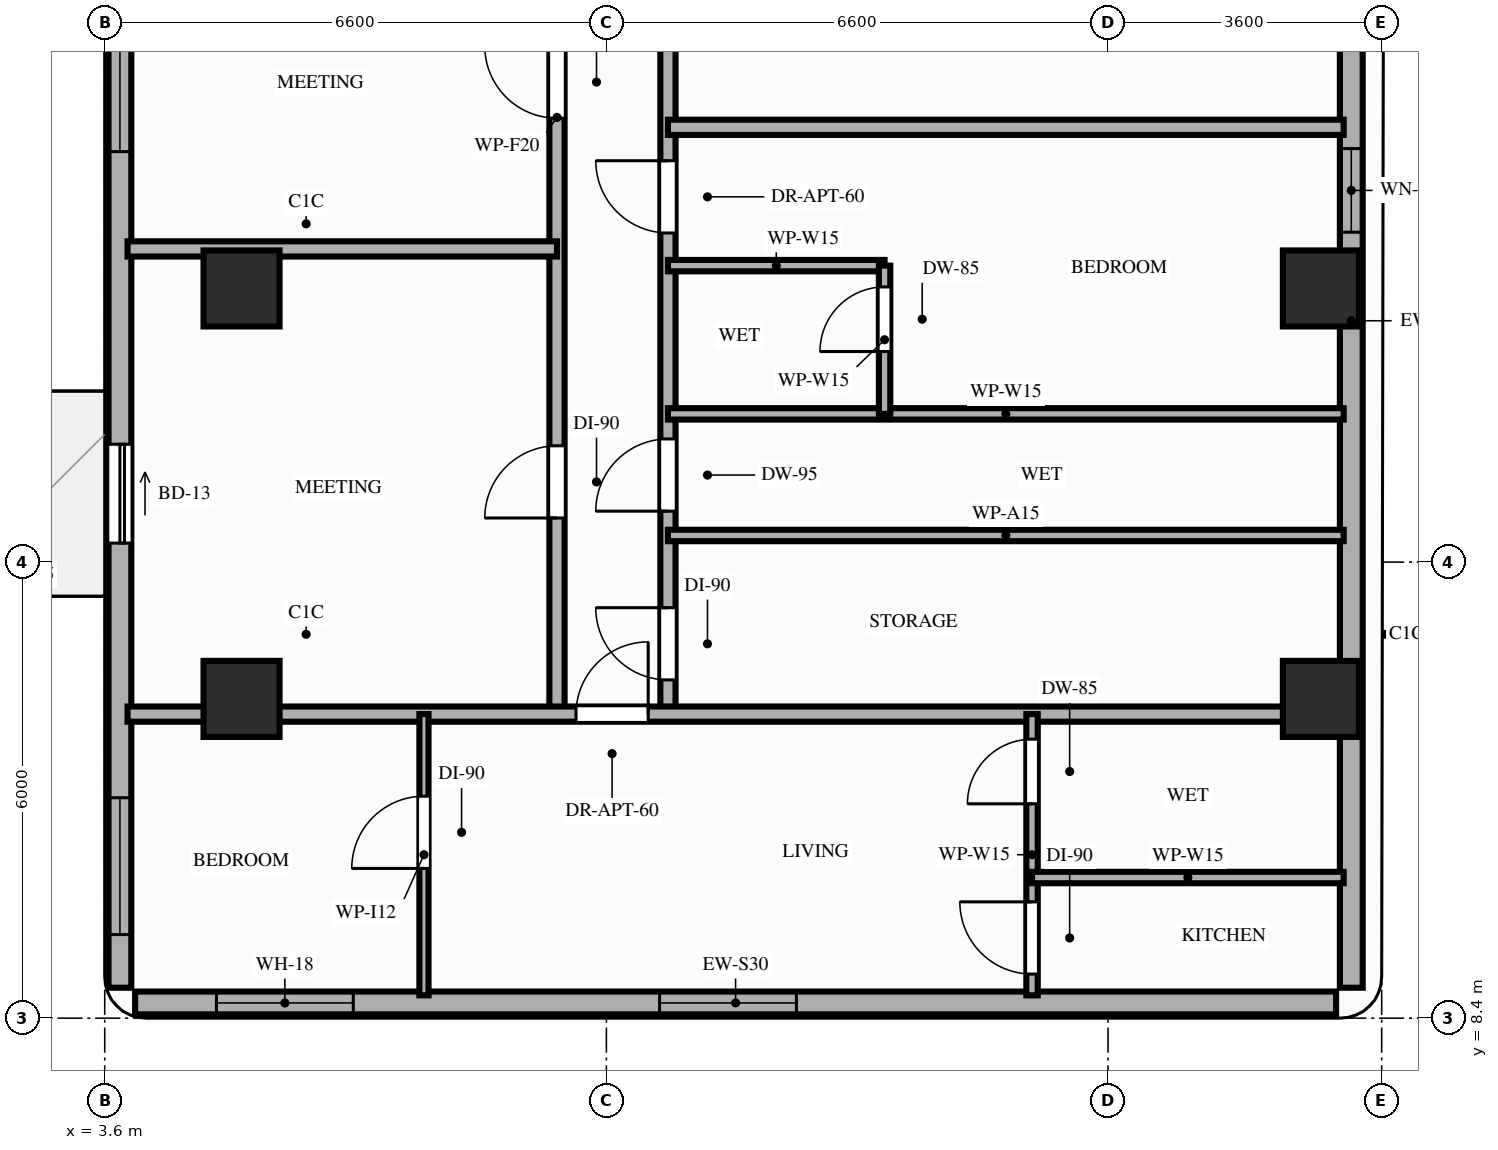
"""IFC4 building model, lengths in metres.
Left out: names, types, materials, properties, quantities, classifications, styles, units other than length and angle.
Written with IfcOpenShell. Run it as: python <this file> out.ifc"""

import sys

from ifc_helpers import new_model, si_unit, direction, frame, frame_2d, origin, origin_2d, place, context, subcontext, project, spatial, rectangle, extrude, element, fill, save


model = new_model("IFC4")
c1 = context("Model", 3, precision=1e-05, world=origin(), true_north=direction((0.0, 1.0)))
c2 = subcontext(c1, "Body", "Model", "MODEL_VIEW")
j1 = project(units=[si_unit("LENGTHUNIT", "METRE"), si_unit("PLANEANGLEUNIT", "RADIAN")], contexts=[c1])
p1 = place(None, origin())
s1 = spatial("IfcSite", under=j1, at=p1, CompositionType="ELEMENT")
p2 = place(p1, origin())
s2 = spatial("IfcBuilding", under=s1, at=p2, CompositionType="ELEMENT")
p3 = place(p2, frame((0.0, 0.0, 129.8)))
s3 = spatial("IfcBuildingStorey", under=s2, at=p3, CompositionType="ELEMENT", Elevation=129.8)
for number, where, z_axis, x_axis in (
    (1, (5.4, 12.6, 0.0), (0.0, 0.0, 1.0), (1.0, 0.0, 0.0)),
    (2, (19.6, 12.6, 0.0), (0.0, 0.0, 1.0), (1.0, 0.0, 0.0)),
    (3, (5.4, 18.0, 0.0), (0.0, 0.0, 1.0), (1.0, 0.0, 0.0)),
    (4, (19.6, 18.0, 0.0), (0.0, 0.0, 1.0), (1.0, 0.0, 0.0)),
):
    element("IfcColumn", number, at=place(p3, frame(where, z_axis=z_axis, x_axis=x_axis)), inside=s3, PredefinedType="COLUMN", context=c2, shape_type="SweptSolid", body=[
        extrude(rectangle(XDim=1.0, YDim=1.0, at=origin_2d()), origin(), (0.0, 0.0, 1.0), 3.2),
    ])
p4 = place(p3, frame((4.0, 8.6, 0.0), z_axis=(0.0, 0.0, 1.0), x_axis=(1.0, 0.0, 0.0)))
e5 = element("IfcWall", 5, at=p4, inside=s3, PredefinedType="STANDARD", context=c2, shape_type="SweptSolid", body=[
    extrude(rectangle(XDim=15.8, YDim=0.3, at=frame_2d((7.9, 0.0))), origin(), (0.0, 0.0, 1.0), 3.02),
])
p5 = place(p4, frame((1.07, 0.0, 0.85)))
e6 = element("IfcOpeningElement", 6, at=p5, cuts=e5, PredefinedType="OPENING", context=c2, shape_type="SweptSolid", body=[
    extrude(rectangle(XDim=1.8, YDim=1.75, at=frame_2d((0.9, 0.875))), frame((0.0, 0.16, 0.0), z_axis=(0.0, -1.0, 0.0), x_axis=(1.0, 0.0, 0.0)), (0.0, 0.0, 1.0), 0.32),
])
p6 = place(p4, frame((6.9, 0.0, 0.85)))
e7 = element("IfcOpeningElement", 7, at=p6, cuts=e5, PredefinedType="OPENING", context=c2, shape_type="SweptSolid", body=[
    extrude(rectangle(XDim=1.8, YDim=1.75, at=frame_2d((0.9, 0.875))), frame((0.0, 0.16, 0.0), z_axis=(0.0, -1.0, 0.0), x_axis=(1.0, 0.0, 0.0)), (0.0, 0.0, 1.0), 0.32),
])
p7 = place(p3, frame((3.8, 42.1, 0.0), z_axis=(0.0, 0.0, 1.0), x_axis=(0.0, -1.0, 0.0)))
e8 = element("IfcWall", 8, at=p7, inside=s3, PredefinedType="STANDARD", context=c2, shape_type="SweptSolid", body=[
    extrude(rectangle(XDim=33.3, YDim=0.3, at=frame_2d((16.65, 0.0))), origin(), (0.0, 0.0, 1.0), 2.71),
])
p8 = place(p7, frame((26.15, 0.0, 0.0)))
e9 = element("IfcOpeningElement", 9, at=p8, cuts=e8, PredefinedType="OPENING", context=c2, shape_type="SweptSolid", body=[
    extrude(rectangle(XDim=1.3, YDim=2.08, at=frame_2d((0.65, 1.04))), frame((0.0, 0.16, 0.0), z_axis=(0.0, -1.0, 0.0), x_axis=(1.0, 0.0, 0.0)), (0.0, 0.0, 1.0), 0.32),
])
p9 = place(p7, frame((15.35, 0.0, 0.0)))
e10 = element("IfcOpeningElement", 10, at=p9, cuts=e8, PredefinedType="OPENING", context=c2, shape_type="SweptSolid", body=[
    extrude(rectangle(XDim=1.3, YDim=2.08, at=frame_2d((0.65, 1.04))), frame((0.0, 0.16, 0.0), z_axis=(0.0, -1.0, 0.0), x_axis=(1.0, 0.0, 0.0)), (0.0, 0.0, 1.0), 0.32),
])
p10 = place(p7, frame((30.8, 0.0, 0.85)))
e11 = element("IfcOpeningElement", 11, at=p10, cuts=e8, PredefinedType="OPENING", context=c2, shape_type="SweptSolid", body=[
    extrude(rectangle(XDim=1.8, YDim=1.61, at=frame_2d((0.9, 0.805))), frame((0.0, 0.16, 0.0), z_axis=(0.0, -1.0, 0.0), x_axis=(1.0, 0.0, 0.0)), (0.0, 0.0, 1.0), 0.32),
])
p11 = place(p7, frame((20.5, 0.0, 0.85)))
e12 = element("IfcOpeningElement", 12, at=p11, cuts=e8, PredefinedType="OPENING", context=c2, shape_type="SweptSolid", body=[
    extrude(rectangle(XDim=1.8, YDim=1.61, at=frame_2d((0.9, 0.805))), frame((0.0, 0.16, 0.0), z_axis=(0.0, -1.0, 0.0), x_axis=(1.0, 0.0, 0.0)), (0.0, 0.0, 1.0), 0.32),
])
p12 = place(p7, frame((9.9, 0.0, 0.85)))
e13 = element("IfcOpeningElement", 13, at=p12, cuts=e8, PredefinedType="OPENING", context=c2, shape_type="SweptSolid", body=[
    extrude(rectangle(XDim=1.8, YDim=1.61, at=frame_2d((0.9, 0.805))), frame((0.0, 0.16, 0.0), z_axis=(0.0, -1.0, 0.0), x_axis=(1.0, 0.0, 0.0)), (0.0, 0.0, 1.0), 0.32),
])
p13 = place(p7, frame((3.8, 0.0, 0.85)))
e14 = element("IfcOpeningElement", 14, at=p13, cuts=e8, PredefinedType="OPENING", context=c2, shape_type="SweptSolid", body=[
    extrude(rectangle(XDim=1.8, YDim=1.61, at=frame_2d((0.9, 0.805))), frame((0.0, 0.16, 0.0), z_axis=(0.0, -1.0, 0.0), x_axis=(1.0, 0.0, 0.0)), (0.0, 0.0, 1.0), 0.32),
])
p14 = place(p3, frame((20.0, 8.8, 0.0), z_axis=(0.0, 0.0, 1.0), x_axis=(0.0, 1.0, 0.0)))
e15 = element("IfcWall", 15, at=p14, inside=s3, PredefinedType="STANDARD", context=c2, shape_type="SweptSolid", body=[
    extrude(rectangle(XDim=17.55, YDim=0.3, at=frame_2d((8.775, 0.0))), origin(), (0.0, 0.0, 1.0), 2.45),
])
p15 = place(p14, frame((9.94, 0.0, 0.85)))
e16 = element("IfcOpeningElement", 16, at=p15, cuts=e15, PredefinedType="OPENING", context=c2, shape_type="SweptSolid", body=[
    extrude(rectangle(XDim=1.1, YDim=1.35, at=frame_2d((0.55, 0.675))), frame((0.0, 0.16, 0.0), z_axis=(0.0, -1.0, 0.0), x_axis=(1.0, 0.0, 0.0)), (0.0, 0.0, 1.0), 0.32),
])
p16 = place(p3, frame((9.55, 12.4, 0.0), z_axis=(0.0, 0.0, 1.0), x_axis=(0.0, 1.0, 0.0)))
e17 = element("IfcWall", 17, at=p16, inside=s3, PredefinedType="PARTITIONING", context=c2, shape_type="SweptSolid", body=[
    extrude(rectangle(XDim=15.7, YDim=0.2, at=frame_2d((7.85, 0.0))), origin(), (0.0, 0.0, 1.0), 2.45),
])
p17 = place(p16, frame((2.58, 0.0, 0.0)))
e18 = element("IfcOpeningElement", 18, at=p17, cuts=e17, PredefinedType="OPENING", context=c2, shape_type="SweptSolid", body=[
    extrude(rectangle(XDim=0.95, YDim=2.15, at=frame_2d((0.475, 1.075))), frame((0.0, 0.11, 0.0), z_axis=(0.0, -1.0, 0.0), x_axis=(1.0, 0.0, 0.0)), (0.0, 0.0, 1.0), 0.22),
])
p18 = place(p16, frame((7.84, 0.0, 0.0)))
e19 = element("IfcOpeningElement", 19, at=p18, cuts=e17, PredefinedType="OPENING", context=c2, shape_type="SweptSolid", body=[
    extrude(rectangle(XDim=0.95, YDim=2.15, at=frame_2d((0.475, 1.075))), frame((0.0, 0.11, 0.0), z_axis=(0.0, -1.0, 0.0), x_axis=(1.0, 0.0, 0.0)), (0.0, 0.0, 1.0), 0.22),
])
p19 = place(p16, frame((12.63, 0.0, 0.0)))
e20 = element("IfcOpeningElement", 20, at=p19, cuts=e17, PredefinedType="OPENING", context=c2, shape_type="SweptSolid", body=[
    extrude(rectangle(XDim=0.95, YDim=2.15, at=frame_2d((0.475, 1.075))), frame((0.0, 0.11, 0.0), z_axis=(0.0, -1.0, 0.0), x_axis=(1.0, 0.0, 0.0)), (0.0, 0.0, 1.0), 0.22),
])
p20 = place(p3, frame((11.01, 12.4, 0.0), z_axis=(0.0, 0.0, 1.0), x_axis=(0.0, 1.0, 0.0)))
e21 = element("IfcWall", 21, at=p20, inside=s3, PredefinedType="PARTITIONING", context=c2, shape_type="SweptSolid", body=[
    extrude(rectangle(XDim=15.7, YDim=0.2, at=frame_2d((7.85, 0.0))), origin(), (0.0, 0.0, 1.0), 2.45),
])
p21 = place(p20, frame((0.45, 0.0, 0.0)))
e22 = element("IfcOpeningElement", 22, at=p21, cuts=e21, PredefinedType="OPENING", context=c2, shape_type="SweptSolid", body=[
    extrude(rectangle(XDim=0.95, YDim=2.15, at=frame_2d((0.475, 1.075))), frame((0.0, 0.11, 0.0), z_axis=(0.0, -1.0, 0.0), x_axis=(1.0, 0.0, 0.0)), (0.0, 0.0, 1.0), 0.22),
])
p22 = place(p20, frame((2.67, 0.0, 0.0)))
e23 = element("IfcOpeningElement", 23, at=p22, cuts=e21, PredefinedType="OPENING", context=c2, shape_type="SweptSolid", body=[
    extrude(rectangle(XDim=0.95, YDim=2.1, at=frame_2d((0.475, 1.05))), frame((0.0, 0.11, 0.0), z_axis=(0.0, -1.0, 0.0), x_axis=(1.0, 0.0, 0.0)), (0.0, 0.0, 1.0), 0.22),
])
p23 = place(p20, frame((11.23, 0.0, 0.0)))
e24 = element("IfcOpeningElement", 24, at=p23, cuts=e21, PredefinedType="OPENING", context=c2, shape_type="SweptSolid", body=[
    extrude(rectangle(XDim=0.95, YDim=2.15, at=frame_2d((0.475, 1.075))), frame((0.0, 0.11, 0.0), z_axis=(0.0, -1.0, 0.0), x_axis=(1.0, 0.0, 0.0)), (0.0, 0.0, 1.0), 0.22),
])
p24 = place(p20, frame((6.33, 0.0, 0.0)))
e25 = element("IfcOpeningElement", 25, at=p24, cuts=e21, PredefinedType="OPENING", context=c2, shape_type="SweptSolid", body=[
    extrude(rectangle(XDim=0.95, YDim=2.15, at=frame_2d((0.475, 1.075))), frame((0.0, 0.11, 0.0), z_axis=(0.0, -1.0, 0.0), x_axis=(1.0, 0.0, 0.0)), (0.0, 0.0, 1.0), 0.22),
])
p25 = place(p3, frame((3.9, 12.4, 0.0), z_axis=(0.0, 0.0, 1.0), x_axis=(1.0, 0.0, 0.0)))
e26 = element("IfcWall", 26, at=p25, inside=s3, PredefinedType="PARTITIONING", context=c2, shape_type="SweptSolid", body=[
    extrude(rectangle(XDim=16.0, YDim=0.2, at=frame_2d((8.0, 0.0))), origin(), (0.0, 0.0, 1.0), 2.45),
])
p26 = place(p25, frame((5.9, 0.0, 0.0)))
e27 = element("IfcOpeningElement", 27, at=p26, cuts=e26, PredefinedType="OPENING", context=c2, shape_type="SweptSolid", body=[
    extrude(rectangle(XDim=0.95, YDim=2.15, at=frame_2d((0.475, 1.075))), frame((0.0, 0.11, 0.0), z_axis=(0.0, -1.0, 0.0), x_axis=(1.0, 0.0, 0.0)), (0.0, 0.0, 1.0), 0.22),
])
p27 = place(p3, frame((3.9, 18.52, 0.0), z_axis=(0.0, 0.0, 1.0), x_axis=(1.0, 0.0, 0.0)))
e28 = element("IfcWall", 28, at=p27, inside=s3, PredefinedType="PARTITIONING", context=c2, shape_type="SweptSolid", body=[
    extrude(rectangle(XDim=5.65, YDim=0.2, at=frame_2d((2.825, 0.0))), origin(), (0.0, 0.0, 1.0), 2.45),
])
p28 = place(p3, frame((7.8, 8.7, 0.0), z_axis=(0.0, 0.0, 1.0), x_axis=(0.0, 1.0, 0.0)))
e29 = element("IfcWall", 29, at=p28, inside=s3, PredefinedType="PARTITIONING", context=c2, shape_type="SweptSolid", body=[
    extrude(rectangle(XDim=3.7, YDim=0.12, at=frame_2d((1.85, 0.0))), origin(), (0.0, 0.0, 1.0), 2.45),
])
p29 = place(p28, frame((1.67, 0.0, 0.0)))
e30 = element("IfcOpeningElement", 30, at=p29, cuts=e29, PredefinedType="OPENING", context=c2, shape_type="SweptSolid", body=[
    extrude(rectangle(XDim=0.95, YDim=2.15, at=frame_2d((0.475, 1.075))), frame((0.0, 0.07, 0.0), z_axis=(0.0, -1.0, 0.0), x_axis=(1.0, 0.0, 0.0)), (0.0, 0.0, 1.0), 0.14),
])
p30 = place(p3, frame((15.8, 8.7, 0.0), z_axis=(0.0, 0.0, 1.0), x_axis=(0.0, 1.0, 0.0)))
e31 = element("IfcWall", 31, at=p30, inside=s3, PredefinedType="PARTITIONING", context=c2, shape_type="SweptSolid", body=[
    extrude(rectangle(XDim=3.7, YDim=0.15, at=frame_2d((1.85, 0.0))), origin(), (0.0, 0.0, 1.0), 2.45),
])
p31 = place(p30, frame((0.28, 0.0, 0.0)))
e32 = element("IfcOpeningElement", 32, at=p31, cuts=e31, PredefinedType="OPENING", context=c2, shape_type="SweptSolid", body=[
    extrude(rectangle(XDim=0.95, YDim=2.15, at=frame_2d((0.475, 1.075))), frame((0.0, 0.085, 0.0), z_axis=(0.0, -1.0, 0.0), x_axis=(1.0, 0.0, 0.0)), (0.0, 0.0, 1.0), 0.17),
])
p32 = place(p30, frame((2.52, 0.0, 0.0)))
e33 = element("IfcOpeningElement", 33, at=p32, cuts=e31, PredefinedType="OPENING", context=c2, shape_type="SweptSolid", body=[
    extrude(rectangle(XDim=0.85, YDim=2.1, at=frame_2d((0.425, 1.05))), frame((0.0, 0.085, 0.0), z_axis=(0.0, -1.0, 0.0), x_axis=(1.0, 0.0, 0.0)), (0.0, 0.0, 1.0), 0.17),
])
p33 = place(p3, frame((15.8, 10.25, 0.0), z_axis=(0.0, 0.0, 1.0), x_axis=(1.0, 0.0, 0.0)))
e34 = element("IfcWall", 34, at=p33, inside=s3, PredefinedType="PARTITIONING", context=c2, shape_type="SweptSolid", body=[
    extrude(rectangle(XDim=4.1, YDim=0.15, at=frame_2d((2.05, 0.0))), origin(), (0.0, 0.0, 1.0), 3.02),
])
for number, where, z_axis, x_axis in (
    (35, (11.01, 14.75, 0.0), (0.0, 0.0, 1.0), (1.0, 0.0, 0.0)),
    (36, (11.01, 16.35, 0.0), (0.0, 0.0, 1.0), (1.0, 0.0, 0.0)),
):
    element("IfcWall", number, at=place(p3, frame(where, z_axis=z_axis, x_axis=x_axis)), inside=s3, PredefinedType="PARTITIONING", context=c2, shape_type="SweptSolid", body=[
        extrude(rectangle(XDim=8.89, YDim=0.15, at=frame_2d((4.445, 0.0))), origin(), (0.0, 0.0, 1.0), 2.45),
    ])
p34 = place(p3, frame((11.01, 20.12, 0.0), z_axis=(0.0, 0.0, 1.0), x_axis=(1.0, 0.0, 0.0)))
e37 = element("IfcWall", 37, at=p34, inside=s3, PredefinedType="PARTITIONING", context=c2, shape_type="SweptSolid", body=[
    extrude(rectangle(XDim=8.89, YDim=0.2, at=frame_2d((4.445, 0.0))), origin(), (0.0, 0.0, 1.0), 2.45),
])
p35 = place(p3, frame((11.01, 18.3, 0.0), z_axis=(0.0, 0.0, 1.0), x_axis=(1.0, 0.0, 0.0)))
e38 = element("IfcWall", 38, at=p35, inside=s3, PredefinedType="PARTITIONING", context=c2, shape_type="SweptSolid", body=[
    extrude(rectangle(XDim=2.85, YDim=0.15, at=frame_2d((1.425, 0.0))), origin(), (0.0, 0.0, 1.0), 2.45),
])
p36 = place(p3, frame((13.86, 16.35, 0.0), z_axis=(0.0, 0.0, 1.0), x_axis=(0.0, 1.0, 0.0)))
e39 = element("IfcWall", 39, at=p36, inside=s3, PredefinedType="PARTITIONING", context=c2, shape_type="SweptSolid", body=[
    extrude(rectangle(XDim=1.95, YDim=0.15, at=frame_2d((0.975, 0.0))), origin(), (0.0, 0.0, 1.0), 2.45),
])
p37 = place(p36, frame((0.82, 0.0, 0.0)))
e40 = element("IfcOpeningElement", 40, at=p37, cuts=e39, PredefinedType="OPENING", context=c2, shape_type="SweptSolid", body=[
    extrude(rectangle(XDim=0.85, YDim=2.1, at=frame_2d((0.425, 1.05))), frame((0.0, 0.085, 0.0), z_axis=(0.0, -1.0, 0.0), x_axis=(1.0, 0.0, 0.0)), (0.0, 0.0, 1.0), 0.17),
])
p38 = place(p8, origin())
e41 = element("IfcDoor", 41, at=p38, inside=s3, OperationType="SLIDING_TO_LEFT", PredefinedType="DOOR", context=c2, shape_type="SweptSolid", body=[
    extrude(rectangle(XDim=1.3, YDim=2.08, at=frame_2d((0.65, 1.04))), frame((0.0, 0.025, 0.0), z_axis=(0.0, -1.0, 0.0), x_axis=(1.0, 0.0, 0.0)), (0.0, 0.0, 1.0), 0.05),
])
fill(e9, e41)
p39 = place(p5, origin())
e42 = element("IfcWindow", 42, at=p39, inside=s3, PartitioningType="SINGLE_PANEL", PredefinedType="WINDOW", context=c2, shape_type="SweptSolid", body=[
    extrude(rectangle(XDim=1.8, YDim=1.75, at=frame_2d((0.9, 0.875))), frame((0.0, 0.03, 0.0), z_axis=(0.0, -1.0, 0.0), x_axis=(1.0, 0.0, 0.0)), (0.0, 0.0, 1.0), 0.06),
])
fill(e6, e42)
p40 = place(p6, origin())
e43 = element("IfcWindow", 43, at=p40, inside=s3, PartitioningType="SINGLE_PANEL", PredefinedType="WINDOW", context=c2, shape_type="SweptSolid", body=[
    extrude(rectangle(XDim=1.8, YDim=1.75, at=frame_2d((0.9, 0.875))), frame((0.0, 0.03, 0.0), z_axis=(0.0, -1.0, 0.0), x_axis=(1.0, 0.0, 0.0)), (0.0, 0.0, 1.0), 0.06),
])
fill(e7, e43)
p41 = place(p15, origin())
e44 = element("IfcWindow", 44, at=p41, inside=s3, PartitioningType="SINGLE_PANEL", PredefinedType="WINDOW", context=c2, shape_type="SweptSolid", body=[
    extrude(rectangle(XDim=1.1, YDim=1.35, at=frame_2d((0.55, 0.675))), frame((0.0, 0.03, 0.0), z_axis=(0.0, -1.0, 0.0), x_axis=(1.0, 0.0, 0.0)), (0.0, 0.0, 1.0), 0.06),
])
fill(e16, e44)
p42 = place(p10, origin())
e45 = element("IfcWindow", 45, at=p42, inside=s3, PartitioningType="SINGLE_PANEL", PredefinedType="WINDOW", context=c2, shape_type="SweptSolid", body=[
    extrude(rectangle(XDim=1.8, YDim=1.61, at=frame_2d((0.9, 0.805))), frame((0.0, 0.03, 0.0), z_axis=(0.0, -1.0, 0.0), x_axis=(1.0, 0.0, 0.0)), (0.0, 0.0, 1.0), 0.06),
])
fill(e11, e45)
p43 = place(p11, origin())
e46 = element("IfcWindow", 46, at=p43, inside=s3, PartitioningType="SINGLE_PANEL", PredefinedType="WINDOW", context=c2, shape_type="SweptSolid", body=[
    extrude(rectangle(XDim=1.8, YDim=1.61, at=frame_2d((0.9, 0.805))), frame((0.0, 0.03, 0.0), z_axis=(0.0, -1.0, 0.0), x_axis=(1.0, 0.0, 0.0)), (0.0, 0.0, 1.0), 0.06),
])
fill(e12, e46)
p44 = place(p17, origin())
e47 = element("IfcDoor", 47, at=p44, inside=s3, OperationType="SINGLE_SWING_LEFT", PredefinedType="DOOR", context=c2, shape_type="SweptSolid", body=[
    extrude(rectangle(XDim=0.95, YDim=2.15, at=frame_2d((0.475, 1.075))), frame((0.0, 0.025, 0.0), z_axis=(0.0, -1.0, 0.0), x_axis=(1.0, 0.0, 0.0)), (0.0, 0.0, 1.0), 0.05),
])
fill(e18, e47)
p45 = place(p18, origin())
e48 = element("IfcDoor", 48, at=p45, inside=s3, OperationType="SINGLE_SWING_RIGHT", PredefinedType="DOOR", context=c2, shape_type="SweptSolid", body=[
    extrude(rectangle(XDim=0.95, YDim=2.15, at=frame_2d((0.475, 1.075))), frame((0.0, 0.025, 0.0), z_axis=(0.0, -1.0, 0.0), x_axis=(1.0, 0.0, 0.0)), (0.0, 0.0, 1.0), 0.05),
])
fill(e19, e48)
p46 = place(p26, origin())
e49 = element("IfcDoor", 49, at=p46, inside=s3, OperationType="SINGLE_SWING_RIGHT", PredefinedType="DOOR", context=c2, shape_type="SweptSolid", body=[
    extrude(rectangle(XDim=0.95, YDim=2.15, at=frame_2d((0.475, 1.075))), frame((0.0, 0.025, 0.0), z_axis=(0.0, -1.0, 0.0), x_axis=(1.0, 0.0, 0.0)), (0.0, 0.0, 1.0), 0.05),
])
fill(e27, e49)
p47 = place(p29, origin())
e50 = element("IfcDoor", 50, at=p47, inside=s3, OperationType="SINGLE_SWING_LEFT", PredefinedType="DOOR", context=c2, shape_type="SweptSolid", body=[
    extrude(rectangle(XDim=0.95, YDim=2.15, at=frame_2d((0.475, 1.075))), frame((0.0, 0.025, 0.0), z_axis=(0.0, -1.0, 0.0), x_axis=(1.0, 0.0, 0.0)), (0.0, 0.0, 1.0), 0.05),
])
fill(e30, e50)
p48 = place(p31, origin())
e51 = element("IfcDoor", 51, at=p48, inside=s3, OperationType="SINGLE_SWING_RIGHT", PredefinedType="DOOR", context=c2, shape_type="SweptSolid", body=[
    extrude(rectangle(XDim=0.95, YDim=2.15, at=frame_2d((0.475, 1.075))), frame((0.0, 0.025, 0.0), z_axis=(0.0, -1.0, 0.0), x_axis=(1.0, 0.0, 0.0)), (0.0, 0.0, 1.0), 0.05),
])
fill(e32, e51)
p49 = place(p32, origin())
e52 = element("IfcDoor", 52, at=p49, inside=s3, OperationType="SINGLE_SWING_LEFT", PredefinedType="DOOR", context=c2, shape_type="SweptSolid", body=[
    extrude(rectangle(XDim=0.85, YDim=2.1, at=frame_2d((0.425, 1.05))), frame((0.0, 0.025, 0.0), z_axis=(0.0, -1.0, 0.0), x_axis=(1.0, 0.0, 0.0)), (0.0, 0.0, 1.0), 0.05),
])
fill(e33, e52)
p50 = place(p21, origin())
e53 = element("IfcDoor", 53, at=p50, inside=s3, OperationType="SINGLE_SWING_RIGHT", PredefinedType="DOOR", context=c2, shape_type="SweptSolid", body=[
    extrude(rectangle(XDim=0.95, YDim=2.15, at=frame_2d((0.475, 1.075))), frame((0.0, 0.025, 0.0), z_axis=(0.0, -1.0, 0.0), x_axis=(1.0, 0.0, 0.0)), (0.0, 0.0, 1.0), 0.05),
])
fill(e22, e53)
p51 = place(p22, origin())
e54 = element("IfcDoor", 54, at=p51, inside=s3, OperationType="SINGLE_SWING_LEFT", PredefinedType="DOOR", context=c2, shape_type="SweptSolid", body=[
    extrude(rectangle(XDim=0.95, YDim=2.1, at=frame_2d((0.475, 1.05))), frame((0.0, 0.025, 0.0), z_axis=(0.0, -1.0, 0.0), x_axis=(1.0, 0.0, 0.0)), (0.0, 0.0, 1.0), 0.05),
])
fill(e23, e54)
p52 = place(p37, origin())
e55 = element("IfcDoor", 55, at=p52, inside=s3, OperationType="SINGLE_SWING_LEFT", PredefinedType="DOOR", context=c2, shape_type="SweptSolid", body=[
    extrude(rectangle(XDim=0.85, YDim=2.1, at=frame_2d((0.425, 1.05))), frame((0.0, 0.025, 0.0), z_axis=(0.0, -1.0, 0.0), x_axis=(1.0, 0.0, 0.0)), (0.0, 0.0, 1.0), 0.05),
])
fill(e40, e55)
p53 = place(p24, origin())
e56 = element("IfcDoor", 56, at=p53, inside=s3, OperationType="SINGLE_SWING_RIGHT", PredefinedType="DOOR", context=c2, shape_type="SweptSolid", body=[
    extrude(rectangle(XDim=0.95, YDim=2.15, at=frame_2d((0.475, 1.075))), frame((0.0, 0.025, 0.0), z_axis=(0.0, -1.0, 0.0), x_axis=(1.0, 0.0, 0.0)), (0.0, 0.0, 1.0), 0.05),
])
fill(e25, e56)
save(model, sys.argv[1])
